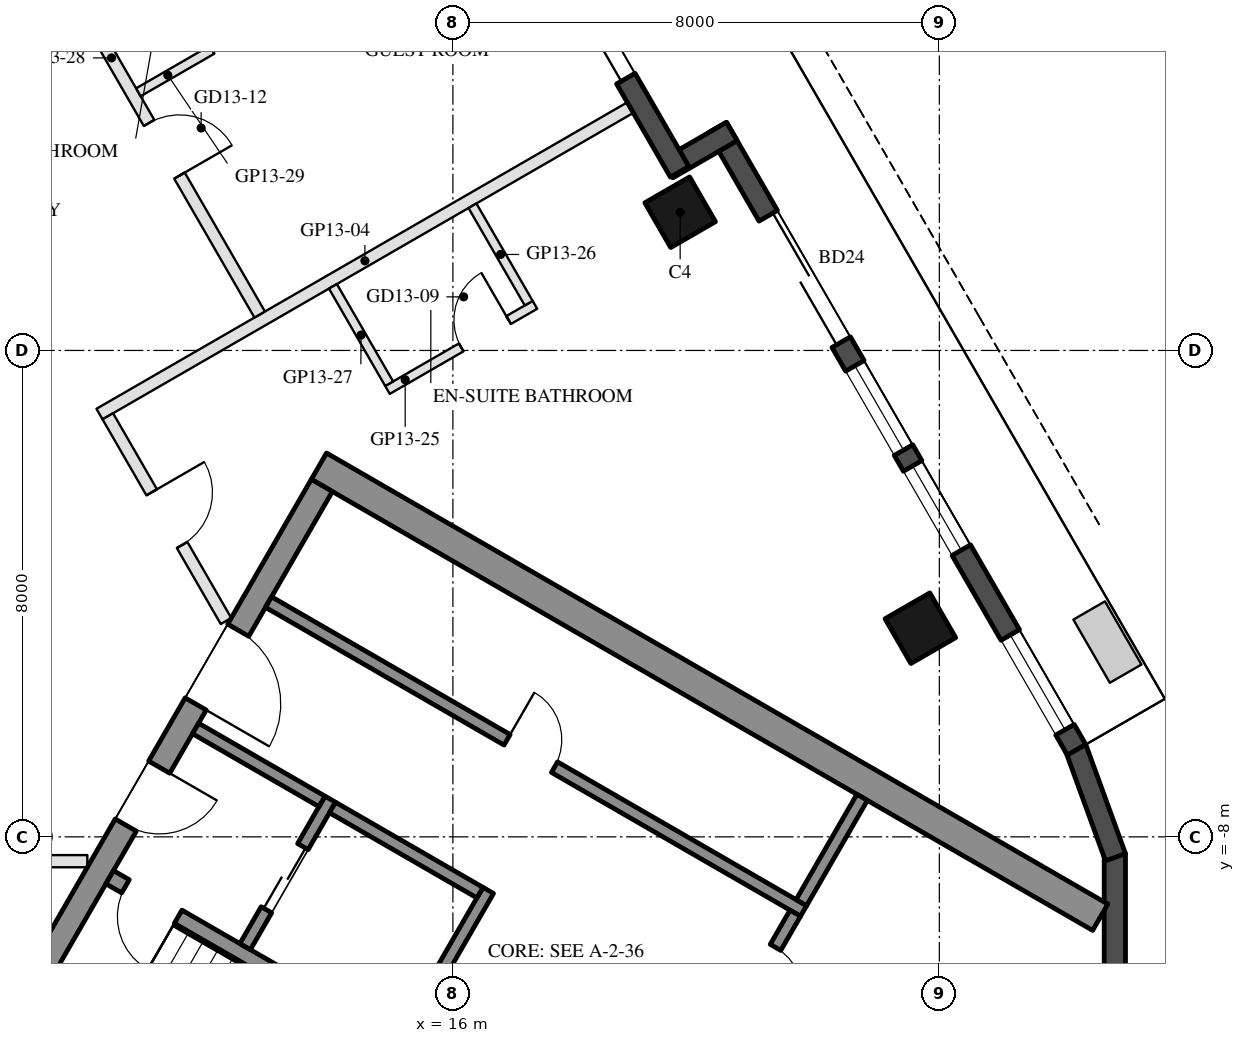
"""IFC4 building model, lengths in metres.
Left out: names, types, materials, properties, quantities, classifications, styles, units other than length and angle.
Written with IfcOpenShell. Run it as: python <this file> out.ifc"""

import sys

from ifc_helpers import new_model, si_unit, direction, frame, frame_2d, origin, origin_2d, place, context, subcontext, project, spatial, rectangle, hollow_rectangle, extrude, element, fill, save


model = new_model("IFC4")
c1 = context("Model", 3, precision=1e-05, world=origin(), true_north=direction((0.0, 1.0)))
c2 = subcontext(c1, "Body", "Model", "MODEL_VIEW")
j1 = project(units=[si_unit("LENGTHUNIT", "METRE"), si_unit("PLANEANGLEUNIT", "RADIAN")], contexts=[c1])
p1 = place(None, origin())
s1 = spatial("IfcSite", under=j1, at=p1, CompositionType="ELEMENT")
p2 = place(p1, origin())
s2 = spatial("IfcBuilding", under=s1, at=p2, CompositionType="ELEMENT")
p3 = place(p2, frame((0.0, 0.0, 157.7)))
s3 = spatial("IfcBuildingStorey", under=s2, at=p3, CompositionType="ELEMENT", Elevation=157.7)
for number, where, z_axis, x_axis in (
    (1, (23.688, -4.568, 0.0), (0.0, 0.0, 1.0), (-0.5, 0.866, 0.0)),
    (2, (19.738, 2.273, 0.0), (0.0, 0.0, 1.0), (-0.5, 0.866, 0.0)),
):
    element("IfcColumn", number, at=place(p3, frame(where, z_axis=z_axis, x_axis=x_axis)), inside=s3, PredefinedType="COLUMN", context=c2, shape_type="SweptSolid", body=[
        extrude(hollow_rectangle(XDim=0.85, YDim=0.85, WallThickness=0.04, at=origin_2d()), origin(), (0.0, 0.0, 1.0), 3.7),
    ])
for number, where, z_axis, x_axis in (
    (3, (26.244, -11.92, 0.0), (0.0, 0.0, 1.0), (0.342, 0.94, 0.0)),
    (4, (26.886, -10.185, 0.0), (0.0, 0.0, 1.0), (0.0, 1.0, 0.0)),
    (5, (26.897, -8.335, 0.0), (0.0, 0.0, 1.0), (-0.342, 0.94, 0.0)),
):
    element("IfcWall", number, at=place(p3, frame(where, z_axis=z_axis, x_axis=x_axis)), inside=s3, PredefinedType="SOLIDWALL", context=c2, shape_type="SweptSolid", body=[
        extrude(rectangle(XDim=1.91, YDim=0.35, at=frame_2d((0.955, 0.0))), origin(), (0.0, 0.0, 1.0), 3.55),
    ])
p4 = place(p3, frame((26.257, -6.567, 0.0), z_axis=(0.0, 0.0, 1.0), x_axis=(-0.500023526245, 0.866011820475, 0.0)))
e6 = element("IfcWall", 6, at=p4, inside=s3, PredefinedType="SOLIDWALL", context=c2, shape_type="SweptSolid", body=[
    extrude(rectangle(XDim=11.816, YDim=0.35, at=frame_2d((5.908, 0.0))), origin(), (0.0, 0.0, 1.0), 3.55),
])
p5 = place(p4, frame((0.38, 0.0, 0.3)))
e7 = element("IfcOpeningElement", 7, at=p5, cuts=e6, PredefinedType="OPENING", context=c2, shape_type="SweptSolid", body=[
    extrude(rectangle(XDim=1.8, YDim=2.65, at=frame_2d((0.9, 1.325))), frame((0.0, 0.185, 0.0), z_axis=(0.0, -1.0, 0.0), x_axis=(1.0, 0.0, 0.0)), (0.0, 0.0, 1.0), 0.37),
])
p6 = place(p4, frame((7.741, 0.0, 0.0)))
e8 = element("IfcOpeningElement", 8, at=p6, cuts=e6, PredefinedType="OPENING", context=c2, shape_type="SweptSolid", body=[
    extrude(rectangle(XDim=2.4, YDim=2.4, at=frame_2d((1.2, 1.2))), frame((0.0, 0.185, 0.0), z_axis=(0.0, -1.0, 0.0), x_axis=(1.0, 0.0, 0.0)), (0.0, 0.0, 1.0), 0.37),
])
p7 = place(p4, frame((3.791, 0.0, 0.3)))
e9 = element("IfcOpeningElement", 9, at=p7, cuts=e6, PredefinedType="OPENING", context=c2, shape_type="SweptSolid", body=[
    extrude(rectangle(XDim=1.6, YDim=2.65, at=frame_2d((0.8, 1.325))), frame((0.0, 0.185, 0.0), z_axis=(0.0, -1.0, 0.0), x_axis=(1.0, 0.0, 0.0)), (0.0, 0.0, 1.0), 0.37),
])
p8 = place(p4, frame((5.691, 0.0, 0.3)))
e10 = element("IfcOpeningElement", 10, at=p8, cuts=e6, PredefinedType="OPENING", context=c2, shape_type="SweptSolid", body=[
    extrude(rectangle(XDim=1.6, YDim=2.65, at=frame_2d((0.8, 1.325))), frame((0.0, 0.185, 0.0), z_axis=(0.0, -1.0, 0.0), x_axis=(1.0, 0.0, 0.0)), (0.0, 0.0, 1.0), 0.37),
])
p9 = place(p3, frame((20.588, 3.601, 0.0), z_axis=(0.0, 0.0, 1.0), x_axis=(-0.866005645448, -0.500034220881, 0.0)))
e11 = element("IfcWall", 11, at=p9, inside=s3, PredefinedType="SOLIDWALL", context=c2, shape_type="SweptSolid", body=[
    extrude(rectangle(XDim=1.22, YDim=0.35, at=frame_2d((0.61, 0.0))), origin(), (0.0, 0.0, 1.0), 3.55),
])
p10 = place(p3, frame((19.729, 2.938, 0.0), z_axis=(0.0, 0.0, 1.0), x_axis=(-0.499976430342, 0.866039011305, 0.0)))
e12 = element("IfcWall", 12, at=p10, inside=s3, PredefinedType="SOLIDWALL", context=c2, shape_type="SweptSolid", body=[
    extrude(rectangle(XDim=6.74, YDim=0.35, at=frame_2d((3.37, 0.0))), origin(), (0.0, 0.0, 1.0), 3.55),
])
p11 = place(p10, frame((1.77, 0.0, 0.0)))
e13 = element("IfcOpeningElement", 13, at=p11, cuts=e12, PredefinedType="OPENING", context=c2, shape_type="SweptSolid", body=[
    extrude(rectangle(XDim=2.4, YDim=2.4, at=frame_2d((1.2, 1.2))), frame((0.0, 0.185, 0.0), z_axis=(0.0, -1.0, 0.0), x_axis=(1.0, 0.0, 0.0)), (0.0, 0.0, 1.0), 0.37),
])
p12 = place(p10, frame((4.47, 0.0, 0.3)))
e14 = element("IfcOpeningElement", 14, at=p12, cuts=e12, PredefinedType="OPENING", context=c2, shape_type="SweptSolid", body=[
    extrude(rectangle(XDim=1.5, YDim=2.65, at=frame_2d((0.75, 1.325))), frame((0.0, 0.185, 0.0), z_axis=(0.0, -1.0, 0.0), x_axis=(1.0, 0.0, 0.0)), (0.0, 0.0, 1.0), 0.37),
])
p13 = place(p3, frame((13.797, -1.903, 0.0), z_axis=(0.0, 0.0, 1.0), x_axis=(0.866025009528, -0.500000682871, 0.0)))
e15 = element("IfcWall", 15, at=p13, inside=s3, PredefinedType="SHEAR", context=c2, shape_type="SweptSolid", body=[
    extrude(rectangle(XDim=14.837, YDim=0.5, at=frame_2d((7.418, 0.0))), origin(), (0.0, 0.0, 1.0), 3.5),
])
p14 = place(p3, frame((8.845, -10.88, 0.0), z_axis=(0.0, 0.0, 1.0), x_axis=(0.500004234368, 0.866022959057, 0.0)))
e16 = element("IfcWall", 16, at=p14, inside=s3, PredefinedType="SHEAR", context=c2, shape_type="SweptSolid", body=[
    extrude(rectangle(XDim=10.0, YDim=0.4, at=frame_2d((5.0, 0.0))), origin(), (0.0, 0.0, 1.0), 3.5),
])
p15 = place(p14, frame((3.55, 0.0, 0.0)))
e17 = element("IfcOpeningElement", 17, at=p15, cuts=e16, PredefinedType="OPENING", context=c2, shape_type="SweptSolid", body=[
    extrude(rectangle(XDim=1.1, YDim=2.1, at=frame_2d((0.55, 1.05))), frame((0.0, 0.21, 0.0), z_axis=(0.0, -1.0, 0.0), x_axis=(1.0, 0.0, 0.0)), (0.0, 0.0, 1.0), 0.42),
])
p16 = place(p14, frame((5.85, 0.0, 0.0)))
e18 = element("IfcOpeningElement", 18, at=p16, cuts=e16, PredefinedType="OPENING", context=c2, shape_type="SweptSolid", body=[
    extrude(rectangle(XDim=1.4, YDim=2.1, at=frame_2d((0.7, 1.05))), frame((0.0, 0.21, 0.0), z_axis=(0.0, -1.0, 0.0), x_axis=(1.0, 0.0, 0.0)), (0.0, 0.0, 1.0), 0.42),
])
p17 = place(p3, frame((10.356, -8.664, 0.0), z_axis=(0.0, 0.0, 1.0), x_axis=(0.866028629588, -0.499994412703, 0.0)))
e19 = element("IfcWall", 19, at=p17, inside=s3, PredefinedType="SHEAR", context=c2, shape_type="SweptSolid", body=[
    extrude(rectangle(XDim=6.45, YDim=0.25, at=frame_2d((3.225, 0.0))), origin(), (0.0, 0.0, 1.0), 3.5),
])
p18 = place(p17, frame((0.3, 0.0, 0.0)))
e20 = element("IfcOpeningElement", 20, at=p18, cuts=e19, PredefinedType="OPENING", context=c2, shape_type="SweptSolid", body=[
    extrude(rectangle(XDim=1.0, YDim=2.1, at=frame_2d((0.5, 1.05))), frame((0.0, 0.135, 0.0), z_axis=(0.0, -1.0, 0.0), x_axis=(1.0, 0.0, 0.0)), (0.0, 0.0, 1.0), 0.27),
])
p19 = place(p3, frame((15.181, -11.305, 0.0), z_axis=(0.0, 0.0, 1.0), x_axis=(0.49994636267, 0.866056369097, 0.0)))
e21 = element("IfcWall", 21, at=p19, inside=s3, PredefinedType="SHEAR", context=c2, shape_type="SweptSolid", body=[
    extrude(rectangle(XDim=2.8, YDim=0.2, at=frame_2d((1.4, 0.0))), origin(), (0.0, 0.0, 1.0), 3.5),
])
p20 = place(p3, frame((12.583, -9.805, 0.0), z_axis=(0.0, 0.0, 1.0), x_axis=(0.49994636267, 0.866056369097, 0.0)))
e22 = element("IfcWall", 22, at=p20, inside=s3, PredefinedType="SHEAR", context=c2, shape_type="SweptSolid", body=[
    extrude(rectangle(XDim=2.8, YDim=0.2, at=frame_2d((1.4, 0.0))), origin(), (0.0, 0.0, 1.0), 3.5),
])
p21 = place(p20, frame((0.7, 0.0, 0.0)))
e23 = element("IfcOpeningElement", 23, at=p21, cuts=e22, PredefinedType="OPENING", context=c2, shape_type="SweptSolid", body=[
    extrude(rectangle(XDim=1.2, YDim=2.1, at=frame_2d((0.6, 1.05))), frame((0.0, 0.11, 0.0), z_axis=(0.0, -1.0, 0.0), x_axis=(1.0, 0.0, 0.0)), (0.0, 0.0, 1.0), 0.22),
])
p22 = place(p3, frame((11.768, -6.217, 0.0), z_axis=(0.0, 0.0, 1.0), x_axis=(0.866050077142, -0.499957262057, 0.0)))
e24 = element("IfcWall", 24, at=p22, inside=s3, PredefinedType="SHEAR", context=c2, shape_type="SweptSolid", body=[
    extrude(rectangle(XDim=2.4, YDim=0.2, at=frame_2d((1.2, 0.0))), origin(), (0.0, 0.0, 1.0), 3.5),
])
p23 = place(p3, frame((14.02, -7.517, 0.0), z_axis=(0.0, 0.0, 1.0), x_axis=(0.866034573852, -0.49998411664, 0.0)))
e25 = element("IfcWall", 25, at=p23, inside=s3, PredefinedType="SHEAR", context=c2, shape_type="SweptSolid", body=[
    extrude(rectangle(XDim=2.8, YDim=0.2, at=frame_2d((1.4, 0.0))), origin(), (0.0, 0.0, 1.0), 3.5),
])
p24 = place(p3, frame((12.968, -4.138, 0.0), z_axis=(0.0, 0.0, 1.0), x_axis=(0.866028328073, -0.49999493495, 0.0)))
e26 = element("IfcWall", 26, at=p24, inside=s3, PredefinedType="SHEAR", context=c2, shape_type="SweptSolid", body=[
    extrude(rectangle(XDim=10.16, YDim=0.2, at=frame_2d((5.08, 0.0))), origin(), (0.0, 0.0, 1.0), 3.5),
])
p25 = place(p24, frame((4.53, 0.0, 0.0)))
e27 = element("IfcOpeningElement", 27, at=p25, cuts=e26, PredefinedType="OPENING", context=c2, shape_type="SweptSolid", body=[
    extrude(rectangle(XDim=0.9, YDim=2.1, at=frame_2d((0.45, 1.05))), frame((0.0, 0.11, 0.0), z_axis=(0.0, -1.0, 0.0), x_axis=(1.0, 0.0, 0.0)), (0.0, 0.0, 1.0), 0.22),
])
p26 = place(p3, frame((20.43, -11.333, 0.0), z_axis=(0.0, 0.0, 1.0), x_axis=(0.500001309137, 0.866024647952, 0.0)))
e28 = element("IfcWall", 28, at=p26, inside=s3, PredefinedType="SHEAR", context=c2, shape_type="SweptSolid", body=[
    extrude(rectangle(XDim=2.4, YDim=0.2, at=frame_2d((1.2, 0.0))), origin(), (0.0, 0.0, 1.0), 3.5),
])
p27 = place(p26, frame((0.85, 0.0, 0.0)))
e29 = element("IfcOpeningElement", 29, at=p27, cuts=e28, PredefinedType="OPENING", context=c2, shape_type="SweptSolid", body=[
    extrude(rectangle(XDim=0.9, YDim=2.1, at=frame_2d((0.45, 1.05))), frame((0.0, 0.11, 0.0), z_axis=(0.0, -1.0, 0.0), x_axis=(1.0, 0.0, 0.0)), (0.0, 0.0, 1.0), 0.22),
])
p28 = place(p3, frame((21.73, -9.082, 0.0), z_axis=(0.0, 0.0, 1.0), x_axis=(0.50002537861, 0.866010750942, 0.0)))
e30 = element("IfcWall", 30, at=p28, inside=s3, PredefinedType="SHEAR", context=c2, shape_type="SweptSolid", body=[
    extrude(rectangle(XDim=2.0, YDim=0.2, at=frame_2d((1.0, 0.0))), origin(), (0.0, 0.0, 1.0), 3.5),
])
p29 = place(p3, frame((18.917, 3.994, 0.0), z_axis=(0.0, 0.0, 1.0), x_axis=(-0.866022637375, -0.500004791531, 0.0)))
e31 = element("IfcWall", 31, at=p29, inside=s3, PredefinedType="PARTITIONING", context=c2, shape_type="SweptSolid", body=[
    extrude(rectangle(XDim=10.08, YDim=0.2, at=frame_2d((5.04, 0.0))), origin(), (0.0, 0.0, 1.0), 3.06),
])
p30 = place(p3, frame((9.988, -8.4, 0.0), z_axis=(0.0, 0.0, 1.0), x_axis=(-1.0, 0.0, 0.0)))
e32 = element("IfcWall", 32, at=p30, inside=s3, PredefinedType="PARTITIONING", context=c2, shape_type="SweptSolid", body=[
    extrude(rectangle(XDim=5.686, YDim=0.2, at=frame_2d((2.843, 0.0))), origin(), (0.0, 0.0, 1.0), 2.95),
])
p31 = place(p30, frame((2.343, 0.0, 0.0)))
e33 = element("IfcOpeningElement", 33, at=p31, cuts=e32, PredefinedType="OPENING", context=c2, shape_type="SweptSolid", body=[
    extrude(rectangle(XDim=1.0, YDim=2.1, at=frame_2d((0.5, 1.05))), frame((0.0, 0.11, 0.0), z_axis=(0.0, -1.0, 0.0), x_axis=(1.0, 0.0, 0.0)), (0.0, 0.0, 1.0), 0.22),
])
p32 = place(p3, frame((10.325, -1.083, 0.0), z_axis=(0.0, 0.0, 1.0), x_axis=(0.500008716408, -0.866020371305, 0.0)))
e34 = element("IfcWall", 34, at=p32, inside=s3, PredefinedType="PARTITIONING", context=c2, shape_type="SweptSolid", body=[
    extrude(rectangle(XDim=3.888, YDim=0.2, at=frame_2d((1.944, 0.0))), origin(), (0.0, 0.0, 1.0), 2.95),
])
p33 = place(p32, frame((1.444, 0.0, 0.0)))
e35 = element("IfcOpeningElement", 35, at=p33, cuts=e34, PredefinedType="OPENING", context=c2, shape_type="SweptSolid", body=[
    extrude(rectangle(XDim=1.0, YDim=2.1, at=frame_2d((0.5, 1.05))), frame((0.0, 0.11, 0.0), z_axis=(0.0, -1.0, 0.0), x_axis=(1.0, 0.0, 0.0)), (0.0, 0.0, 1.0), 0.22),
])
p34 = place(p3, frame((14.924, -0.65, 0.0), z_axis=(0.0, 0.0, 1.0), x_axis=(0.866056369097, 0.49994636267, 0.0)))
e36 = element("IfcWall", 36, at=p34, inside=s3, PredefinedType="PARTITIONING", context=c2, shape_type="SweptSolid", body=[
    extrude(rectangle(XDim=2.8, YDim=0.15, at=frame_2d((1.4, 0.0))), origin(), (0.0, 0.0, 1.0), 2.95),
])
p35 = place(p34, frame((1.4, 0.0, 0.0)))
e37 = element("IfcOpeningElement", 37, at=p35, cuts=e36, PredefinedType="OPENING", context=c2, shape_type="SweptSolid", body=[
    extrude(rectangle(XDim=0.9, YDim=2.1, at=frame_2d((0.45, 1.05))), frame((0.0, 0.085, 0.0), z_axis=(0.0, -1.0, 0.0), x_axis=(1.0, 0.0, 0.0)), (0.0, 0.0, 1.0), 0.17),
])
for number, where, z_axis, x_axis in (
    (38, (17.247, 0.778, 0.0), (0.0, 0.0, 1.0), (-0.5, 0.866, 0.0)),
    (39, (14.952, -0.547, 0.0), (0.0, 0.0, 1.0), (-0.5, 0.866, 0.0)),
):
    element("IfcWall", number, at=place(p3, frame(where, z_axis=z_axis, x_axis=x_axis)), inside=s3, PredefinedType="PARTITIONING", context=c2, shape_type="SweptSolid", body=[
        extrude(rectangle(XDim=1.85, YDim=0.15, at=frame_2d((0.925, 0.0))), origin(), (0.0, 0.0, 1.0), 2.95),
    ])
p36 = place(p3, frame((9.777, 5.867, 0.0), z_axis=(0.0, 0.0, 1.0), x_axis=(0.499996493545, -0.866027428228, 0.0)))
e40 = element("IfcWall", 40, at=p36, inside=s3, PredefinedType="PARTITIONING", context=c2, shape_type="SweptSolid", body=[
    extrude(rectangle(XDim=6.092, YDim=0.2, at=frame_2d((3.046, 0.0))), origin(), (0.0, 0.0, 1.0), 2.95),
])
p37 = place(p36, frame((2.454, 0.0, 0.0)))
e41 = element("IfcOpeningElement", 41, at=p37, cuts=e40, PredefinedType="OPENING", context=c2, shape_type="SweptSolid", body=[
    extrude(rectangle(XDim=1.0, YDim=2.1, at=frame_2d((0.5, 1.05))), frame((0.0, 0.11, 0.0), z_axis=(0.0, -1.0, 0.0), x_axis=(1.0, 0.0, 0.0)), (0.0, 0.0, 1.0), 0.22),
])
p38 = place(p3, frame((10.827, 4.246, 0.0), z_axis=(0.0, 0.0, 1.0), x_axis=(0.866018616679, 0.500011755427, 0.0)))
e42 = element("IfcWall", 42, at=p38, inside=s3, PredefinedType="PARTITIONING", context=c2, shape_type="SweptSolid", body=[
    extrude(rectangle(XDim=2.8, YDim=0.15, at=frame_2d((1.4, 0.0))), origin(), (0.0, 0.0, 1.0), 3.55),
])
p39 = place(p38, frame((1.4, 0.0, 0.0)))
e43 = element("IfcOpeningElement", 43, at=p39, cuts=e42, PredefinedType="OPENING", context=c2, shape_type="SweptSolid", body=[
    extrude(rectangle(XDim=0.9, YDim=2.1, at=frame_2d((0.45, 1.05))), frame((0.0, 0.085, 0.0), z_axis=(0.0, -1.0, 0.0), x_axis=(1.0, 0.0, 0.0)), (0.0, 0.0, 1.0), 0.17),
])
p40 = place(p5, origin())
e44 = element("IfcWindow", 44, at=p40, inside=s3, PartitioningType="SINGLE_PANEL", PredefinedType="WINDOW", context=c2, shape_type="SweptSolid", body=[
    extrude(rectangle(XDim=1.8, YDim=2.65, at=frame_2d((0.9, 1.325))), frame((0.0, 0.03, 0.0), z_axis=(0.0, -1.0, 0.0), x_axis=(1.0, 0.0, 0.0)), (0.0, 0.0, 1.0), 0.06),
])
fill(e7, e44)
p41 = place(p6, frame((2.4, 0.0, 0.0), z_axis=(0.0, 0.0, 1.0), x_axis=(-1.0, 0.0, 0.0)))
e45 = element("IfcDoor", 45, at=p41, inside=s3, OperationType="SLIDING_TO_LEFT", PredefinedType="DOOR", context=c2, shape_type="SweptSolid", body=[
    extrude(rectangle(XDim=2.4, YDim=2.4, at=frame_2d((1.2, 1.2))), frame((0.0, 0.025, 0.0), z_axis=(0.0, -1.0, 0.0), x_axis=(1.0, 0.0, 0.0)), (0.0, 0.0, 1.0), 0.05),
])
fill(e8, e45)
p42 = place(p7, origin())
e46 = element("IfcWindow", 46, at=p42, inside=s3, PartitioningType="SINGLE_PANEL", PredefinedType="WINDOW", context=c2, shape_type="SweptSolid", body=[
    extrude(rectangle(XDim=1.6, YDim=2.65, at=frame_2d((0.8, 1.325))), frame((0.0, 0.03, 0.0), z_axis=(0.0, -1.0, 0.0), x_axis=(1.0, 0.0, 0.0)), (0.0, 0.0, 1.0), 0.06),
])
fill(e9, e46)
p43 = place(p8, origin())
e47 = element("IfcWindow", 47, at=p43, inside=s3, PartitioningType="SINGLE_PANEL", PredefinedType="WINDOW", context=c2, shape_type="SweptSolid", body=[
    extrude(rectangle(XDim=1.6, YDim=2.65, at=frame_2d((0.8, 1.325))), frame((0.0, 0.03, 0.0), z_axis=(0.0, -1.0, 0.0), x_axis=(1.0, 0.0, 0.0)), (0.0, 0.0, 1.0), 0.06),
])
fill(e10, e47)
p44 = place(p11, frame((2.4, 0.0, 0.0), z_axis=(0.0, 0.0, 1.0), x_axis=(-1.0, 0.0, 0.0)))
e48 = element("IfcDoor", 48, at=p44, inside=s3, OperationType="SLIDING_TO_LEFT", PredefinedType="DOOR", context=c2, shape_type="SweptSolid", body=[
    extrude(rectangle(XDim=2.4, YDim=2.4, at=frame_2d((1.2, 1.2))), frame((0.0, 0.025, 0.0), z_axis=(0.0, -1.0, 0.0), x_axis=(1.0, 0.0, 0.0)), (0.0, 0.0, 1.0), 0.05),
])
fill(e13, e48)
p45 = place(p21, origin())
e49 = element("IfcDoor", 49, at=p45, inside=s3, OperationType="DOUBLE_DOOR_SLIDING", PredefinedType="DOOR", context=c2, shape_type="SweptSolid", body=[
    extrude(rectangle(XDim=1.2, YDim=2.1, at=frame_2d((0.6, 1.05))), frame((0.0, 0.025, 0.0), z_axis=(0.0, -1.0, 0.0), x_axis=(1.0, 0.0, 0.0)), (0.0, 0.0, 1.0), 0.05),
])
fill(e23, e49)
p46 = place(p25, origin())
e50 = element("IfcDoor", 50, at=p46, inside=s3, OperationType="SINGLE_SWING_LEFT", PredefinedType="DOOR", context=c2, shape_type="SweptSolid", body=[
    extrude(rectangle(XDim=0.9, YDim=2.1, at=frame_2d((0.45, 1.05))), frame((0.0, 0.025, 0.0), z_axis=(0.0, -1.0, 0.0), x_axis=(1.0, 0.0, 0.0)), (0.0, 0.0, 1.0), 0.05),
])
fill(e27, e50)
p47 = place(p27, frame((0.9, 0.0, 0.0), z_axis=(0.0, 0.0, 1.0), x_axis=(-1.0, 0.0, 0.0)))
e51 = element("IfcDoor", 51, at=p47, inside=s3, OperationType="SINGLE_SWING_RIGHT", PredefinedType="DOOR", context=c2, shape_type="SweptSolid", body=[
    extrude(rectangle(XDim=0.9, YDim=2.1, at=frame_2d((0.45, 1.05))), frame((0.0, 0.025, 0.0), z_axis=(0.0, -1.0, 0.0), x_axis=(1.0, 0.0, 0.0)), (0.0, 0.0, 1.0), 0.05),
])
fill(e29, e51)
p48 = place(p15, frame((1.1, 0.0, 0.0), z_axis=(0.0, 0.0, 1.0), x_axis=(-1.0, 0.0, 0.0)))
e52 = element("IfcDoor", 52, at=p48, inside=s3, OperationType="SINGLE_SWING_LEFT", PredefinedType="DOOR", context=c2, shape_type="SweptSolid", body=[
    extrude(rectangle(XDim=1.1, YDim=2.1, at=frame_2d((0.55, 1.05))), frame((0.0, 0.025, 0.0), z_axis=(0.0, -1.0, 0.0), x_axis=(1.0, 0.0, 0.0)), (0.0, 0.0, 1.0), 0.05),
])
fill(e17, e52)
p49 = place(p16, frame((1.4, 0.0, 0.0), z_axis=(0.0, 0.0, 1.0), x_axis=(-1.0, 0.0, 0.0)))
e53 = element("IfcDoor", 53, at=p49, inside=s3, OperationType="DOUBLE_DOOR_SINGLE_SWING", PredefinedType="DOOR", context=c2, shape_type="SweptSolid", body=[
    extrude(rectangle(XDim=1.4, YDim=2.1, at=frame_2d((0.7, 1.05))), frame((0.0, 0.025, 0.0), z_axis=(0.0, -1.0, 0.0), x_axis=(1.0, 0.0, 0.0)), (0.0, 0.0, 1.0), 0.05),
])
fill(e18, e53)
p50 = place(p18, frame((1.0, 0.0, 0.0), z_axis=(0.0, 0.0, 1.0), x_axis=(-1.0, 0.0, 0.0)))
e54 = element("IfcDoor", 54, at=p50, inside=s3, OperationType="SINGLE_SWING_LEFT", PredefinedType="DOOR", context=c2, shape_type="SweptSolid", body=[
    extrude(rectangle(XDim=1.0, YDim=2.1, at=frame_2d((0.5, 1.05))), frame((0.0, 0.025, 0.0), z_axis=(0.0, -1.0, 0.0), x_axis=(1.0, 0.0, 0.0)), (0.0, 0.0, 1.0), 0.05),
])
fill(e20, e54)
p51 = place(p35, origin())
e55 = element("IfcDoor", 55, at=p51, inside=s3, OperationType="SINGLE_SWING_RIGHT", PredefinedType="DOOR", context=c2, shape_type="SweptSolid", body=[
    extrude(rectangle(XDim=0.9, YDim=2.1, at=frame_2d((0.45, 1.05))), frame((0.0, 0.025, 0.0), z_axis=(0.0, -1.0, 0.0), x_axis=(1.0, 0.0, 0.0)), (0.0, 0.0, 1.0), 0.05),
])
fill(e37, e55)
p52 = place(p33, origin())
e56 = element("IfcDoor", 56, at=p52, inside=s3, OperationType="SINGLE_SWING_LEFT", PredefinedType="DOOR", context=c2, shape_type="SweptSolid", body=[
    extrude(rectangle(XDim=1.0, YDim=2.1, at=frame_2d((0.5, 1.05))), frame((0.0, 0.025, 0.0), z_axis=(0.0, -1.0, 0.0), x_axis=(1.0, 0.0, 0.0)), (0.0, 0.0, 1.0), 0.05),
])
fill(e35, e56)
p53 = place(p37, origin())
e57 = element("IfcDoor", 57, at=p53, inside=s3, OperationType="SINGLE_SWING_RIGHT", PredefinedType="DOOR", context=c2, shape_type="SweptSolid", body=[
    extrude(rectangle(XDim=1.0, YDim=2.1, at=frame_2d((0.5, 1.05))), frame((0.0, 0.025, 0.0), z_axis=(0.0, -1.0, 0.0), x_axis=(1.0, 0.0, 0.0)), (0.0, 0.0, 1.0), 0.05),
])
fill(e41, e57)
save(model, sys.argv[1])
